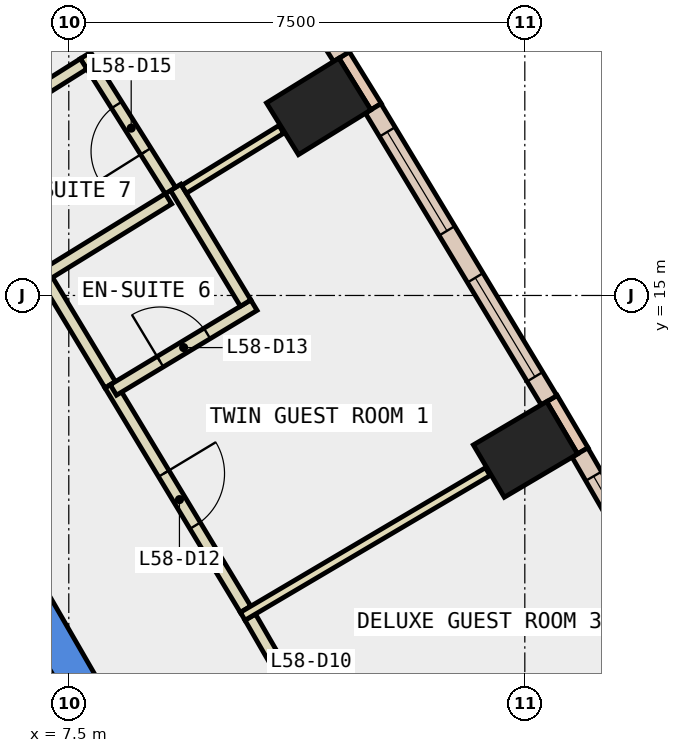
"""IFC4 building model, lengths in metres.
Left out: names, types, materials, properties, quantities, classifications, styles, units other than length and angle.
Written with IfcOpenShell. Run it as: python <this file> out.ifc"""

import sys

from ifc_helpers import new_model, si_unit, direction, frame, frame_2d, origin, origin_2d, place, context, subcontext, project, spatial, polyline, rectangle, outline, extrude, element, fill, save


model = new_model("IFC4")
c1 = context("Model", 3, precision=1e-05, world=origin(), true_north=direction((0.0, 1.0)))
c2 = subcontext(c1, "Body", "Model", "MODEL_VIEW")
j1 = project(units=[si_unit("LENGTHUNIT", "METRE"), si_unit("PLANEANGLEUNIT", "RADIAN")], contexts=[c1])
p1 = place(None, origin())
s1 = spatial("IfcSite", under=j1, at=p1, CompositionType="ELEMENT")
p2 = place(p1, origin())
s2 = spatial("IfcBuilding", under=s1, at=p2, CompositionType="ELEMENT")
p3 = place(p2, frame((0.0, 0.0, 255.8)))
s3 = spatial("IfcBuildingStorey", under=s2, at=p3, CompositionType="ELEMENT", Elevation=255.8)
for number, where, z_axis, x_axis in (
    (1, (15.011, 12.468, -0.34), (0.0, 0.0, 1.0), (-0.509, 0.861, 0.0)),
    (2, (11.61, 18.109, -0.34), (0.0, 0.0, 1.0), (-0.526, 0.851, 0.0)),
):
    element("IfcColumn", number, at=place(p3, frame(where, z_axis=z_axis, x_axis=x_axis)), inside=s3, PredefinedType="COLUMN", context=c2, shape_type="SweptSolid", body=[
        extrude(rectangle(XDim=1.0, YDim=1.4, at=origin_2d()), origin(), (0.0, 0.0, 1.0), 3.6),
    ])
p4 = place(p3, frame((0.0, 0.0, -0.34)))
e3 = element("IfcWall", 3, at=p4, inside=s3, PredefinedType="SHEAR", context=c2, shape_type="SweptSolid", body=[
    extrude(outline(polyline([(6.786, 10.747), (6.266, 10.447), (10.854, 2.5), (11.547, 2.5), (6.786, 10.747)])), origin(), (0.0, 0.0, 1.0), 3.6),
])
p5 = place(p3, frame((15.954, 12.445, 0.0), z_axis=(0.0, 0.0, 1.0), x_axis=(-0.508268432768, 0.861198699634, 0.0)))
e4 = element("IfcWall", 4, at=p5, inside=s3, PredefinedType="STANDARD", context=c2, shape_type="SweptSolid", body=[
    extrude(rectangle(XDim=1.0, YDim=0.2, at=frame_2d((0.5, 0.0))), origin(), (0.0, 0.0, 1.0), 3.26),
])
p6 = place(p3, frame((12.554, 18.104, 0.0), z_axis=(0.0, 0.0, 1.0), x_axis=(-0.525648735675, 0.850701714282, 0.0)))
e5 = element("IfcWall", 5, at=p6, inside=s3, PredefinedType="STANDARD", context=c2, shape_type="SweptSolid", body=[
    extrude(rectangle(XDim=1.0, YDim=0.2, at=frame_2d((0.5, 0.0))), origin(), (0.0, 0.0, 1.0), 3.26),
])
p7 = place(p3, frame((18.708, 7.566, 0.0), z_axis=(0.0, 0.0, 1.0), x_axis=(-0.500089564757, 0.865973687372, 0.0)))
e6 = element("IfcWall", 6, at=p7, inside=s3, PredefinedType="STANDARD", context=c2, shape_type="SweptSolid", body=[
    extrude(rectangle(XDim=5.603, YDim=0.3, at=frame_2d((2.802, 0.0))), origin(), (0.0, 0.0, 1.0), 3.26),
])
p8 = place(p7, frame((0.451, 0.0, 0.9)))
e7 = element("IfcOpeningElement", 7, at=p8, cuts=e6, PredefinedType="OPENING", context=c2, shape_type="SweptSolid", body=[
    extrude(rectangle(XDim=1.9, YDim=2.0, at=frame_2d((0.95, 1.0))), frame((0.0, 0.16, 0.0), z_axis=(0.0, -1.0, 0.0), x_axis=(1.0, 0.0, 0.0)), (0.0, 0.0, 1.0), 0.32),
])
p9 = place(p7, frame((3.252, 0.0, 0.9)))
e8 = element("IfcOpeningElement", 8, at=p9, cuts=e6, PredefinedType="OPENING", context=c2, shape_type="SweptSolid", body=[
    extrude(rectangle(XDim=1.9, YDim=2.0, at=frame_2d((0.95, 1.0))), frame((0.0, 0.16, 0.0), z_axis=(0.0, -1.0, 0.0), x_axis=(1.0, 0.0, 0.0)), (0.0, 0.0, 1.0), 0.32),
])
p10 = place(p3, frame((15.399, 13.277, 0.0), z_axis=(0.0, 0.0, 1.0), x_axis=(-0.516269519619, 0.856426169096, 0.0)))
e9 = element("IfcWall", 9, at=p10, inside=s3, PredefinedType="STANDARD", context=c2, shape_type="SweptSolid", body=[
    extrude(rectangle(XDim=5.603, YDim=0.3, at=frame_2d((2.802, 0.0))), origin(), (0.0, 0.0, 1.0), 3.26),
])
p11 = place(p10, frame((0.451, 0.0, 0.9)))
e10 = element("IfcOpeningElement", 10, at=p11, cuts=e9, PredefinedType="OPENING", context=c2, shape_type="SweptSolid", body=[
    extrude(rectangle(XDim=1.9, YDim=2.0, at=frame_2d((0.95, 1.0))), frame((0.0, 0.16, 0.0), z_axis=(0.0, -1.0, 0.0), x_axis=(1.0, 0.0, 0.0)), (0.0, 0.0, 1.0), 0.32),
])
p12 = place(p10, frame((3.253, 0.0, 0.9)))
e11 = element("IfcOpeningElement", 11, at=p12, cuts=e9, PredefinedType="OPENING", context=c2, shape_type="SweptSolid", body=[
    extrude(rectangle(XDim=1.9, YDim=2.0, at=frame_2d((0.95, 1.0))), frame((0.0, 0.16, 0.0), z_axis=(0.0, -1.0, 0.0), x_axis=(1.0, 0.0, 0.0)), (0.0, 0.0, 1.0), 0.32),
])
p13 = place(p3, frame((11.983, 18.926, 0.0), z_axis=(0.0, 0.0, 1.0), x_axis=(-0.532558226688, 0.846393369059, 0.0)))
e12 = element("IfcWall", 12, at=p13, inside=s3, PredefinedType="STANDARD", context=c2, shape_type="SweptSolid", body=[
    extrude(rectangle(XDim=5.637, YDim=0.3, at=frame_2d((2.818, 0.0))), origin(), (0.0, 0.0, 1.0), 3.26),
])
p14 = place(p13, frame((0.459, 0.0, 0.9)))
e13 = element("IfcOpeningElement", 13, at=p14, cuts=e12, PredefinedType="OPENING", context=c2, shape_type="SweptSolid", body=[
    extrude(rectangle(XDim=1.9, YDim=2.0, at=frame_2d((0.95, 1.0))), frame((0.0, 0.16, 0.0), z_axis=(0.0, -1.0, 0.0), x_axis=(1.0, 0.0, 0.0)), (0.0, 0.0, 1.0), 0.32),
])
p15 = place(p13, frame((3.278, 0.0, 0.9)))
e14 = element("IfcOpeningElement", 14, at=p15, cuts=e12, PredefinedType="OPENING", context=c2, shape_type="SweptSolid", body=[
    extrude(rectangle(XDim=1.9, YDim=2.0, at=frame_2d((0.95, 1.0))), frame((0.0, 0.16, 0.0), z_axis=(0.0, -1.0, 0.0), x_axis=(1.0, 0.0, 0.0)), (0.0, 0.0, 1.0), 0.32),
])
p16 = place(p3, frame((10.484, 9.71, 0.0), z_axis=(0.0, 0.0, 1.0), x_axis=(0.500034145141, -0.866005689181, 0.0)))
e15 = element("IfcWall", 15, at=p16, inside=s3, PredefinedType="PARTITIONING", context=c2, shape_type="SweptSolid", body=[
    extrude(rectangle(XDim=3.91, YDim=0.2, at=frame_2d((1.955, 0.0))), origin(), (0.0, 0.0, 1.0), 3.26),
])
p17 = place(p16, frame((1.505, 0.0, 0.0)))
e16 = element("IfcOpeningElement", 16, at=p17, cuts=e15, PredefinedType="OPENING", context=c2, shape_type="SweptSolid", body=[
    extrude(rectangle(XDim=1.0, YDim=2.1, at=frame_2d((0.5, 1.05))), frame((0.0, 0.11, 0.0), z_axis=(0.0, -1.0, 0.0), x_axis=(1.0, 0.0, 0.0)), (0.0, 0.0, 1.0), 0.22),
])
p18 = place(p3, frame((8.181, 13.532, 0.0), z_axis=(0.0, 0.0, 1.0), x_axis=(0.51625987265, -0.856431984393, 0.0)))
e17 = element("IfcWall", 17, at=p18, inside=s3, PredefinedType="PARTITIONING", context=c2, shape_type="SweptSolid", body=[
    extrude(rectangle(XDim=4.312, YDim=0.2, at=frame_2d((2.156, 0.0))), origin(), (0.0, 0.0, 1.0), 3.26),
])
p19 = place(p18, frame((1.706, 0.0, 0.0)))
e18 = element("IfcOpeningElement", 18, at=p19, cuts=e17, PredefinedType="OPENING", context=c2, shape_type="SweptSolid", body=[
    extrude(rectangle(XDim=1.0, YDim=2.1, at=frame_2d((0.5, 1.05))), frame((0.0, 0.11, 0.0), z_axis=(0.0, -1.0, 0.0), x_axis=(1.0, 0.0, 0.0)), (0.0, 0.0, 1.0), 0.22),
])
p20 = place(p3, frame((7.148, 15.245, 0.0), z_axis=(0.0, 0.0, 1.0), x_axis=(0.516361066184, -0.856370976463, 0.0)))
e19 = element("IfcWall", 19, at=p20, inside=s3, PredefinedType="PARTITIONING", context=c2, shape_type="SweptSolid", body=[
    extrude(rectangle(XDim=2.0, YDim=0.2, at=frame_2d((1.0, 0.0))), origin(), (0.0, 0.0, 1.0), 3.26),
])
p21 = place(p3, frame((5.766, 17.446, 0.0), z_axis=(0.0, 0.0, 1.0), x_axis=(0.532437006176, -0.846469629966, 0.0)))
e20 = element("IfcWall", 20, at=p21, inside=s3, PredefinedType="PARTITIONING", context=c2, shape_type="SweptSolid", body=[
    extrude(rectangle(XDim=2.599, YDim=0.2, at=frame_2d((1.299, 0.0))), origin(), (0.0, 0.0, 1.0), 3.26),
])
p22 = place(p3, frame((10.36, 9.724, 0.0), z_axis=(0.0, 0.0, 1.0), x_axis=(0.861211954005, 0.508245974188, 0.0)))
e21 = element("IfcWall", 21, at=p22, inside=s3, PredefinedType="PARTITIONING", context=c2, shape_type="SweptSolid", body=[
    extrude(rectangle(XDim=4.681, YDim=0.15, at=frame_2d((2.34, 0.0))), origin(), (0.0, 0.0, 1.0), 3.26),
])
p23 = place(p3, frame((8.233, 13.446, 0.0), z_axis=(0.0, 0.0, 1.0), x_axis=(0.856373825811, 0.516356340589, 0.0)))
e22 = element("IfcWall", 22, at=p23, inside=s3, PredefinedType="PARTITIONING", context=c2, shape_type="SweptSolid", body=[
    extrude(rectangle(XDim=2.7, YDim=0.2, at=frame_2d((1.35, 0.0))), origin(), (0.0, 0.0, 1.0), 3.26),
])
p24 = place(p23, frame((0.9, 0.0, 0.0)))
e23 = element("IfcOpeningElement", 23, at=p24, cuts=e22, PredefinedType="OPENING", context=c2, shape_type="SweptSolid", body=[
    extrude(rectangle(XDim=0.9, YDim=2.1, at=frame_2d((0.45, 1.05))), frame((0.0, 0.11, 0.0), z_axis=(0.0, -1.0, 0.0), x_axis=(1.0, 0.0, 0.0)), (0.0, 0.0, 1.0), 0.22),
])
p25 = place(p3, frame((10.408, 14.874, 0.0), z_axis=(0.0, 0.0, 1.0), x_axis=(-0.516768967276, 0.856124894195, 0.0)))
e24 = element("IfcWall", 24, at=p25, inside=s3, PredefinedType="PARTITIONING", context=c2, shape_type="SweptSolid", body=[
    extrude(rectangle(XDim=2.225, YDim=0.2, at=frame_2d((1.113, 0.0))), origin(), (0.0, 0.0, 1.0), 3.26),
])
p26 = place(p3, frame((9.395, 16.746, 0.0), z_axis=(0.0, 0.0, 1.0), x_axis=(0.851524542888, 0.524314745987, 0.0)))
e25 = element("IfcWall", 25, at=p26, inside=s3, PredefinedType="PARTITIONING", context=c2, shape_type="SweptSolid", body=[
    extrude(rectangle(XDim=1.88, YDim=0.15, at=frame_2d((0.94, 0.0))), origin(), (0.0, 0.0, 1.0), 3.26),
])
p27 = place(p3, frame((7.097, 15.33, 0.0), z_axis=(0.0, 0.0, 1.0), x_axis=(0.851207242031, 0.524829716302, 0.0)))
e26 = element("IfcWall", 26, at=p27, inside=s3, PredefinedType="PARTITIONING", context=c2, shape_type="SweptSolid", body=[
    extrude(rectangle(XDim=2.399, YDim=0.2, at=frame_2d((1.199, 0.0))), origin(), (0.0, 0.0, 1.0), 3.26),
])
p28 = place(p3, frame((9.172, 16.725, 0.0), z_axis=(0.0, 0.0, 1.0), x_axis=(-0.532329646536, 0.846537150643, 0.0)))
e27 = element("IfcWall", 27, at=p28, inside=s3, PredefinedType="PARTITIONING", context=c2, shape_type="SweptSolid", body=[
    extrude(rectangle(XDim=2.625, YDim=0.2, at=frame_2d((1.312, 0.0))), origin(), (0.0, 0.0, 1.0), 3.26),
])
p29 = place(p28, frame((0.763, 0.0, 0.0)))
e28 = element("IfcOpeningElement", 28, at=p29, cuts=e27, PredefinedType="OPENING", context=c2, shape_type="SweptSolid", body=[
    extrude(rectangle(XDim=0.9, YDim=2.1, at=frame_2d((0.45, 1.05))), frame((0.0, 0.11, 0.0), z_axis=(0.0, -1.0, 0.0), x_axis=(1.0, 0.0, 0.0)), (0.0, 0.0, 1.0), 0.22),
])
p30 = place(p3, frame((7.744, 18.809, 0.0), z_axis=(0.0, 0.0, 1.0), x_axis=(-0.846360434059, -0.532610566605, 0.0)))
e29 = element("IfcWall", 29, at=p30, inside=s3, PredefinedType="PARTITIONING", context=c2, shape_type="SweptSolid", body=[
    extrude(rectangle(XDim=2.3, YDim=0.2, at=frame_2d((1.15, 0.0))), origin(), (0.0, 0.0, 1.0), 3.26),
])
p31 = place(p3, frame((8.48, 3.412, 0.0), z_axis=(0.0, 0.0, 1.0), x_axis=(-0.499978703459, 0.866037698999, 0.0)))
e30 = element("IfcWall", 30, at=p31, inside=s3, PredefinedType="STANDARD", context=c2, shape_type="SweptSolid", body=[
    extrude(rectangle(XDim=6.9, YDim=0.2, at=frame_2d((3.45, 0.0))), origin(), (0.0, 0.0, 1.0), 3.26),
])
p32 = place(p9, origin())
e31 = element("IfcWindow", 31, at=p32, inside=s3, PartitioningType="SINGLE_PANEL", PredefinedType="WINDOW", context=c2, shape_type="SweptSolid", body=[
    extrude(rectangle(XDim=1.9, YDim=2.0, at=frame_2d((0.95, 1.0))), frame((0.0, 0.03, 0.0), z_axis=(0.0, -1.0, 0.0), x_axis=(1.0, 0.0, 0.0)), (0.0, 0.0, 1.0), 0.06),
])
fill(e8, e31)
p33 = place(p11, origin())
e32 = element("IfcWindow", 32, at=p33, inside=s3, PartitioningType="SINGLE_PANEL", PredefinedType="WINDOW", context=c2, shape_type="SweptSolid", body=[
    extrude(rectangle(XDim=1.9, YDim=2.0, at=frame_2d((0.95, 1.0))), frame((0.0, 0.03, 0.0), z_axis=(0.0, -1.0, 0.0), x_axis=(1.0, 0.0, 0.0)), (0.0, 0.0, 1.0), 0.06),
])
fill(e10, e32)
p34 = place(p12, origin())
e33 = element("IfcWindow", 33, at=p34, inside=s3, PartitioningType="SINGLE_PANEL", PredefinedType="WINDOW", context=c2, shape_type="SweptSolid", body=[
    extrude(rectangle(XDim=1.9, YDim=2.0, at=frame_2d((0.95, 1.0))), frame((0.0, 0.03, 0.0), z_axis=(0.0, -1.0, 0.0), x_axis=(1.0, 0.0, 0.0)), (0.0, 0.0, 1.0), 0.06),
])
fill(e11, e33)
p35 = place(p19, origin())
e34 = element("IfcDoor", 34, at=p35, inside=s3, OperationType="SINGLE_SWING_LEFT", PredefinedType="DOOR", context=c2, shape_type="SweptSolid", body=[
    extrude(rectangle(XDim=1.0, YDim=2.1, at=frame_2d((0.5, 1.05))), frame((0.0, 0.025, 0.0), z_axis=(0.0, -1.0, 0.0), x_axis=(1.0, 0.0, 0.0)), (0.0, 0.0, 1.0), 0.05),
])
fill(e18, e34)
p36 = place(p24, origin())
e35 = element("IfcDoor", 35, at=p36, inside=s3, OperationType="SINGLE_SWING_LEFT", PredefinedType="DOOR", context=c2, shape_type="SweptSolid", body=[
    extrude(rectangle(XDim=0.9, YDim=2.1, at=frame_2d((0.45, 1.05))), frame((0.0, 0.025, 0.0), z_axis=(0.0, -1.0, 0.0), x_axis=(1.0, 0.0, 0.0)), (0.0, 0.0, 1.0), 0.05),
])
fill(e23, e35)
p37 = place(p29, origin())
e36 = element("IfcDoor", 36, at=p37, inside=s3, OperationType="SINGLE_SWING_LEFT", PredefinedType="DOOR", context=c2, shape_type="SweptSolid", body=[
    extrude(rectangle(XDim=0.9, YDim=2.1, at=frame_2d((0.45, 1.05))), frame((0.0, 0.025, 0.0), z_axis=(0.0, -1.0, 0.0), x_axis=(1.0, 0.0, 0.0)), (0.0, 0.0, 1.0), 0.05),
])
fill(e28, e36)
save(model, sys.argv[1])
